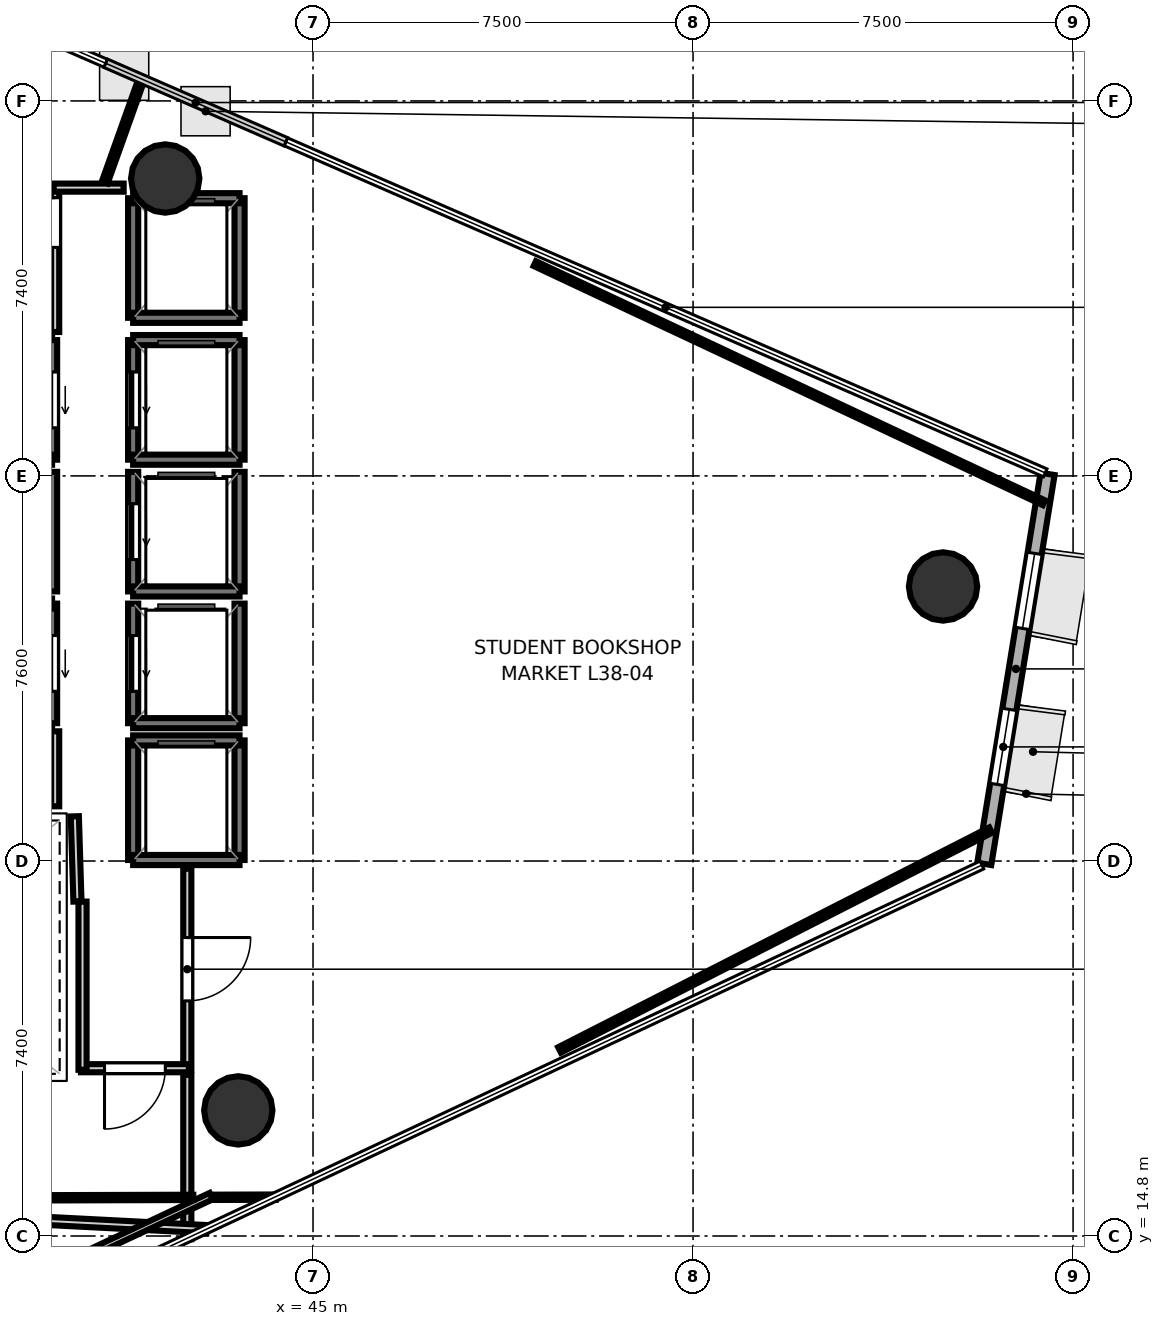
"""IFC4 building model, lengths in metres.
Left out: names, types, materials, properties, quantities, classifications, styles, units other than length and angle.
Written with IfcOpenShell. Run it as: python <this file> out.ifc"""

import sys

from ifc_helpers import new_model, si_unit, direction, frame, frame_2d, origin, origin_2d, place, context, subcontext, project, spatial, rectangle, hollow_circle, extrude, element, fill, save


model = new_model("IFC4")
c1 = context("Model", 3, precision=1e-05, world=origin(), true_north=direction((0.0, 1.0)))
c2 = subcontext(c1, "Body", "Model", "MODEL_VIEW")
j1 = project(units=[si_unit("LENGTHUNIT", "METRE"), si_unit("PLANEANGLEUNIT", "RADIAN")], contexts=[c1])
p1 = place(None, origin())
s1 = spatial("IfcSite", under=j1, at=p1, CompositionType="ELEMENT")
p2 = place(p1, origin())
s2 = spatial("IfcBuilding", under=s1, at=p2, CompositionType="ELEMENT")
p3 = place(p2, frame((0.0, 0.0, 151.3)))
s3 = spatial("IfcBuildingStorey", under=s2, at=p3, CompositionType="ELEMENT", Elevation=151.3)
for number, where, z_axis, x_axis in (
    (1, (57.434, 27.618, 0.0), (0.0, 0.0, 1.0), (1.0, 0.0, 0.0)),
    (2, (42.083, 35.669, 0.0), (0.0, 0.0, 1.0), (1.0, 0.0, 0.0)),
    (3, (43.525, 17.279, 0.0), (0.0, 0.0, 1.0), (1.0, 0.0, 0.0)),
):
    element("IfcColumn", number, at=place(p3, frame(where, z_axis=z_axis, x_axis=x_axis)), inside=s3, PredefinedType="COLUMN", context=c2, shape_type="SweptSolid", body=[
        extrude(hollow_circle(Radius=0.675, WallThickness=0.032, at=origin_2d()), origin(), (0.0, 0.0, 1.0), 3.7),
    ])
p4 = place(p3, frame((58.247, 22.143, 0.0), z_axis=(0.0, 0.0, 1.0), x_axis=(0.160295411126, 0.987069086322, 0.0)))
e4 = element("IfcWall", 4, at=p4, inside=s3, PredefinedType="SOLIDWALL", context=c2, shape_type="SweptSolid", body=[
    extrude(rectangle(XDim=7.798, YDim=0.28, at=frame_2d((3.899, 0.0))), origin(), (0.0, 0.0, 1.0), 3.52),
])
p5 = place(p4, frame((1.589, 0.0, 0.85)))
e5 = element("IfcOpeningElement", 5, at=p5, cuts=e4, PredefinedType="OPENING", context=c2, shape_type="SweptSolid", body=[
    extrude(rectangle(XDim=1.5, YDim=2.1, at=frame_2d((0.75, 1.05))), frame((0.0, 0.15, 0.0), z_axis=(0.0, -1.0, 0.0), x_axis=(1.0, 0.0, 0.0)), (0.0, 0.0, 1.0), 0.3),
])
p6 = place(p4, frame((4.708, 0.0, 0.85)))
e6 = element("IfcOpeningElement", 6, at=p6, cuts=e4, PredefinedType="OPENING", context=c2, shape_type="SweptSolid", body=[
    extrude(rectangle(XDim=1.5, YDim=2.1, at=frame_2d((0.75, 1.05))), frame((0.0, 0.15, 0.0), z_axis=(0.0, -1.0, 0.0), x_axis=(1.0, 0.0, 0.0)), (0.0, 0.0, 1.0), 0.3),
])
p7 = place(p3, frame((39.85, 30.12, 0.0), z_axis=(0.0, 0.0, 1.0), x_axis=(0.0, 1.0, 0.0)))
e7 = element("IfcWall", 7, at=p7, inside=s3, PredefinedType="SOLIDWALL", context=c2, shape_type="SweptSolid", body=[
    extrude(rectangle(XDim=2.36, YDim=0.2, at=frame_2d((1.18, 0.0))), origin(), (0.0, 0.0, 1.0), 3.52),
])
p8 = place(p7, frame((0.63, 0.0, 0.0)))
e8 = element("IfcOpeningElement", 8, at=p8, cuts=e7, PredefinedType="OPENING", context=c2, shape_type="SweptSolid", body=[
    extrude(rectangle(XDim=1.1, YDim=2.15, at=frame_2d((0.55, 1.075))), frame((0.0, 0.11, 0.0), z_axis=(0.0, -1.0, 0.0), x_axis=(1.0, 0.0, 0.0)), (0.0, 0.0, 1.0), 0.22),
])
p9 = place(p3, frame((39.85, 24.92, 0.0), z_axis=(0.0, 0.0, 1.0), x_axis=(0.0, 1.0, 0.0)))
e9 = element("IfcWall", 9, at=p9, inside=s3, PredefinedType="SOLIDWALL", context=c2, shape_type="SweptSolid", body=[
    extrude(rectangle(XDim=2.36, YDim=0.2, at=frame_2d((1.18, 0.0))), origin(), (0.0, 0.0, 1.0), 3.52),
])
p10 = place(p9, frame((0.63, 0.0, 0.0)))
e10 = element("IfcOpeningElement", 10, at=p10, cuts=e9, PredefinedType="OPENING", context=c2, shape_type="SweptSolid", body=[
    extrude(rectangle(XDim=1.1, YDim=2.15, at=frame_2d((0.55, 1.075))), frame((0.0, 0.11, 0.0), z_axis=(0.0, -1.0, 0.0), x_axis=(1.0, 0.0, 0.0)), (0.0, 0.0, 1.0), 0.22),
])
p11 = place(p3, frame((43.55, 30.12, 0.0), z_axis=(0.0, 0.0, 1.0), x_axis=(0.0, 1.0, 0.0)))
e11 = element("IfcWall", 11, at=p11, inside=s3, PredefinedType="SOLIDWALL", context=c2, shape_type="SweptSolid", body=[
    extrude(rectangle(XDim=2.36, YDim=0.2, at=frame_2d((1.18, 0.0))), origin(), (0.0, 0.0, 1.0), 3.52),
])
p12 = place(p3, frame((41.45, 30.12, 0.0), z_axis=(0.0, 0.0, 1.0), x_axis=(0.0, 1.0, 0.0)))
e12 = element("IfcWall", 12, at=p12, inside=s3, PredefinedType="SOLIDWALL", context=c2, shape_type="SweptSolid", body=[
    extrude(rectangle(XDim=2.36, YDim=0.2, at=frame_2d((1.18, 0.0))), origin(), (0.0, 0.0, 1.0), 3.52),
])
p13 = place(p12, frame((0.63, 0.0, 0.0)))
e13 = element("IfcOpeningElement", 13, at=p13, cuts=e12, PredefinedType="OPENING", context=c2, shape_type="SweptSolid", body=[
    extrude(rectangle(XDim=1.1, YDim=2.15, at=frame_2d((0.55, 1.075))), frame((0.0, 0.11, 0.0), z_axis=(0.0, -1.0, 0.0), x_axis=(1.0, 0.0, 0.0)), (0.0, 0.0, 1.0), 0.22),
])
for number, where, z_axis, x_axis in (
    (14, (41.45, 32.48, 0.0), (0.0, 0.0, 1.0), (1.0, 0.0, 0.0)),
    (15, (41.45, 30.12, 0.0), (0.0, 0.0, 1.0), (1.0, 0.0, 0.0)),
):
    element("IfcWall", number, at=place(p3, frame(where, z_axis=z_axis, x_axis=x_axis)), inside=s3, PredefinedType="SOLIDWALL", context=c2, shape_type="SweptSolid", body=[
        extrude(rectangle(XDim=2.1, YDim=0.2, at=frame_2d((1.05, 0.0))), origin(), (0.0, 0.0, 1.0), 3.52),
    ])
p14 = place(p3, frame((43.55, 27.52, 0.0), z_axis=(0.0, 0.0, 1.0), x_axis=(0.0, 1.0, 0.0)))
e16 = element("IfcWall", 16, at=p14, inside=s3, PredefinedType="SOLIDWALL", context=c2, shape_type="SweptSolid", body=[
    extrude(rectangle(XDim=2.36, YDim=0.2, at=frame_2d((1.18, 0.0))), origin(), (0.0, 0.0, 1.0), 3.52),
])
p15 = place(p3, frame((41.45, 27.52, 0.0), z_axis=(0.0, 0.0, 1.0), x_axis=(0.0, 1.0, 0.0)))
e17 = element("IfcWall", 17, at=p15, inside=s3, PredefinedType="SOLIDWALL", context=c2, shape_type="SweptSolid", body=[
    extrude(rectangle(XDim=2.36, YDim=0.2, at=frame_2d((1.18, 0.0))), origin(), (0.0, 0.0, 1.0), 3.52),
])
p16 = place(p15, frame((0.63, 0.0, 0.0)))
e18 = element("IfcOpeningElement", 18, at=p16, cuts=e17, PredefinedType="OPENING", context=c2, shape_type="SweptSolid", body=[
    extrude(rectangle(XDim=1.1, YDim=2.15, at=frame_2d((0.55, 1.075))), frame((0.0, 0.11, 0.0), z_axis=(0.0, -1.0, 0.0), x_axis=(1.0, 0.0, 0.0)), (0.0, 0.0, 1.0), 0.22),
])
p17 = place(p3, frame((41.45, 27.52, 0.0), z_axis=(0.0, 0.0, 1.0), x_axis=(1.0, 0.0, 0.0)))
e19 = element("IfcWall", 19, at=p17, inside=s3, PredefinedType="SOLIDWALL", context=c2, shape_type="SweptSolid", body=[
    extrude(rectangle(XDim=2.1, YDim=0.2, at=frame_2d((1.05, 0.0))), origin(), (0.0, 0.0, 1.0), 3.52),
])
p18 = place(p3, frame((43.55, 24.92, 0.0), z_axis=(0.0, 0.0, 1.0), x_axis=(0.0, 1.0, 0.0)))
e20 = element("IfcWall", 20, at=p18, inside=s3, PredefinedType="SOLIDWALL", context=c2, shape_type="SweptSolid", body=[
    extrude(rectangle(XDim=2.36, YDim=0.2, at=frame_2d((1.18, 0.0))), origin(), (0.0, 0.0, 1.0), 3.52),
])
p19 = place(p3, frame((41.45, 24.92, 0.0), z_axis=(0.0, 0.0, 1.0), x_axis=(0.0, 1.0, 0.0)))
e21 = element("IfcWall", 21, at=p19, inside=s3, PredefinedType="SOLIDWALL", context=c2, shape_type="SweptSolid", body=[
    extrude(rectangle(XDim=2.36, YDim=0.2, at=frame_2d((1.18, 0.0))), origin(), (0.0, 0.0, 1.0), 3.52),
])
p20 = place(p19, frame((0.63, 0.0, 0.0)))
e22 = element("IfcOpeningElement", 22, at=p20, cuts=e21, PredefinedType="OPENING", context=c2, shape_type="SweptSolid", body=[
    extrude(rectangle(XDim=1.1, YDim=2.15, at=frame_2d((0.55, 1.075))), frame((0.0, 0.11, 0.0), z_axis=(0.0, -1.0, 0.0), x_axis=(1.0, 0.0, 0.0)), (0.0, 0.0, 1.0), 0.22),
])
p21 = place(p3, frame((41.45, 24.92, 0.0), z_axis=(0.0, 0.0, 1.0), x_axis=(1.0, 0.0, 0.0)))
e23 = element("IfcWall", 23, at=p21, inside=s3, PredefinedType="SOLIDWALL", context=c2, shape_type="SweptSolid", body=[
    extrude(rectangle(XDim=2.1, YDim=0.2, at=frame_2d((1.05, 0.0))), origin(), (0.0, 0.0, 1.0), 3.52),
])
p22 = place(p3, frame((39.85, 27.52, 0.0), z_axis=(0.0, 0.0, 1.0), x_axis=(0.0, 1.0, 0.0)))
e24 = element("IfcWall", 24, at=p22, inside=s3, PredefinedType="SOLIDWALL", context=c2, shape_type="SweptSolid", body=[
    extrude(rectangle(XDim=2.36, YDim=0.2, at=frame_2d((1.18, 0.0))), origin(), (0.0, 0.0, 1.0), 3.52),
])
for number, where, z_axis, x_axis in (
    (25, (43.55, 22.22, 0.0), (0.0, 0.0, 1.0), (0.0, 1.0, 0.0)),
    (26, (41.45, 22.22, 0.0), (0.0, 0.0, 1.0), (0.0, 1.0, 0.0)),
):
    element("IfcWall", number, at=place(p3, frame(where, z_axis=z_axis, x_axis=x_axis)), inside=s3, PredefinedType="SOLIDWALL", context=c2, shape_type="SweptSolid", body=[
        extrude(rectangle(XDim=2.36, YDim=0.2, at=frame_2d((1.18, 0.0))), origin(), (0.0, 0.0, 1.0), 3.52),
    ])
for number, where, z_axis, x_axis in (
    (27, (41.45, 24.58, 0.0), (0.0, 0.0, 1.0), (1.0, 0.0, 0.0)),
    (28, (41.45, 22.22, 0.0), (0.0, 0.0, 1.0), (1.0, 0.0, 0.0)),
):
    element("IfcWall", number, at=place(p3, frame(where, z_axis=z_axis, x_axis=x_axis)), inside=s3, PredefinedType="SOLIDWALL", context=c2, shape_type="SweptSolid", body=[
        extrude(rectangle(XDim=2.1, YDim=0.2, at=frame_2d((1.05, 0.0))), origin(), (0.0, 0.0, 1.0), 3.52),
    ])
for number, where, z_axis, x_axis in (
    (29, (43.55, 32.92, 0.0), (0.0, 0.0, 1.0), (0.0, 1.0, 0.0)),
    (30, (41.45, 32.92, 0.0), (0.0, 0.0, 1.0), (0.0, 1.0, 0.0)),
):
    element("IfcWall", number, at=place(p3, frame(where, z_axis=z_axis, x_axis=x_axis)), inside=s3, PredefinedType="SOLIDWALL", context=c2, shape_type="SweptSolid", body=[
        extrude(rectangle(XDim=2.36, YDim=0.2, at=frame_2d((1.18, 0.0))), origin(), (0.0, 0.0, 1.0), 3.52),
    ])
for number, where, z_axis, x_axis in (
    (31, (41.45, 35.28, 0.0), (0.0, 0.0, 1.0), (1.0, 0.0, 0.0)),
    (32, (41.45, 32.92, 0.0), (0.0, 0.0, 1.0), (1.0, 0.0, 0.0)),
):
    element("IfcWall", number, at=place(p3, frame(where, z_axis=z_axis, x_axis=x_axis)), inside=s3, PredefinedType="SOLIDWALL", context=c2, shape_type="SweptSolid", body=[
        extrude(rectangle(XDim=2.1, YDim=0.2, at=frame_2d((1.05, 0.0))), origin(), (0.0, 0.0, 1.0), 3.52),
    ])
p23 = place(p3, frame((40.351, 21.401, 0.0), z_axis=(0.0, 0.0, 1.0), x_axis=(-0.031058045979, 0.999517582527, 0.0)))
e33 = element("IfcWall", 33, at=p23, inside=s3, PredefinedType="PARTITIONING", context=c2, shape_type="SweptSolid", body=[
    extrude(rectangle(XDim=1.682, YDim=0.16, at=frame_2d((0.841, 0.0))), origin(), (0.0, 0.0, 1.0), 2.84),
])
p24 = place(p3, frame((39.911, 23.28, 0.0), z_axis=(0.0, 0.0, 1.0), x_axis=(0.0, 1.0, 0.0)))
e34 = element("IfcWall", 34, at=p24, inside=s3, PredefinedType="PARTITIONING", context=c2, shape_type="SweptSolid", body=[
    extrude(rectangle(XDim=1.48, YDim=0.16, at=frame_2d((0.74, 0.0))), origin(), (0.0, 0.0, 1.0), 2.84),
])
p25 = place(p3, frame((39.911, 32.64, 0.0), z_axis=(0.0, 0.0, 1.0), x_axis=(0.0, 1.0, 0.0)))
e35 = element("IfcWall", 35, at=p25, inside=s3, PredefinedType="PARTITIONING", context=c2, shape_type="SweptSolid", body=[
    extrude(rectangle(XDim=2.88, YDim=0.16, at=frame_2d((1.44, 0.0))), origin(), (0.0, 0.0, 1.0), 2.84),
])
p26 = place(p25, frame((1.67, 0.0, 0.0)))
e36 = element("IfcOpeningElement", 36, at=p26, cuts=e35, PredefinedType="OPENING", context=c2, shape_type="SweptSolid", body=[
    extrude(rectangle(XDim=0.98, YDim=2.1, at=frame_2d((0.49, 1.05))), frame((0.0, 0.09, 0.0), z_axis=(0.0, -1.0, 0.0), x_axis=(1.0, 0.0, 0.0)), (0.0, 0.0, 1.0), 0.18),
])
p27 = place(p3, frame((39.88, 35.489, 0.0), z_axis=(0.0, 0.0, 1.0), x_axis=(1.0, 0.0, 0.0)))
e37 = element("IfcWall", 37, at=p27, inside=s3, PredefinedType="PARTITIONING", context=c2, shape_type="SweptSolid", body=[
    extrude(rectangle(XDim=1.383, YDim=0.16, at=frame_2d((0.691, 0.0))), origin(), (0.0, 0.0, 1.0), 2.84),
])
p28 = place(p3, frame((42.519, 22.05, 0.0), z_axis=(0.0, 0.0, 1.0), x_axis=(0.0, -1.0, 0.0)))
e38 = element("IfcWall", 38, at=p28, inside=s3, PredefinedType="PARTITIONING", context=c2, shape_type="SweptSolid", body=[
    extrude(rectangle(XDim=3.97, YDim=0.16, at=frame_2d((1.985, 0.0))), origin(), (0.0, 0.0, 1.0), 2.84),
])
p29 = place(p28, frame((1.36, 0.0, 0.0)))
e39 = element("IfcOpeningElement", 39, at=p29, cuts=e38, PredefinedType="OPENING", context=c2, shape_type="SweptSolid", body=[
    extrude(rectangle(XDim=1.25, YDim=2.2, at=frame_2d((0.625, 1.1))), frame((0.0, 0.09, 0.0), z_axis=(0.0, -1.0, 0.0), x_axis=(1.0, 0.0, 0.0)), (0.0, 0.0, 1.0), 0.18),
])
p30 = place(p3, frame((42.55, 18.111, 0.0), z_axis=(0.0, 0.0, 1.0), x_axis=(-1.0, 0.0, 0.0)))
e40 = element("IfcWall", 40, at=p30, inside=s3, PredefinedType="PARTITIONING", context=c2, shape_type="SweptSolid", body=[
    extrude(rectangle(XDim=2.13, YDim=0.16, at=frame_2d((1.065, 0.0))), origin(), (0.0, 0.0, 1.0), 2.84),
])
p31 = place(p30, frame((0.465, 0.0, 0.0)))
e41 = element("IfcOpeningElement", 41, at=p31, cuts=e40, PredefinedType="OPENING", context=c2, shape_type="SweptSolid", body=[
    extrude(rectangle(XDim=1.2, YDim=2.15, at=frame_2d((0.6, 1.075))), frame((0.0, 0.09, 0.0), z_axis=(0.0, -1.0, 0.0), x_axis=(1.0, 0.0, 0.0)), (0.0, 0.0, 1.0), 0.18),
])
p32 = place(p3, frame((40.451, 18.08, 0.0), z_axis=(0.0, 0.0, 1.0), x_axis=(0.0, 1.0, 0.0)))
e42 = element("IfcWall", 42, at=p32, inside=s3, PredefinedType="PARTITIONING", context=c2, shape_type="SweptSolid", body=[
    extrude(rectangle(XDim=3.32, YDim=0.16, at=frame_2d((1.66, 0.0))), origin(), (0.0, 0.0, 1.0), 2.84),
])
p33 = place(p3, frame((42.519, 17.98, 0.0), z_axis=(0.0, 0.0, 1.0), x_axis=(0.0, -1.0, 0.0)))
e43 = element("IfcWall", 43, at=p33, inside=s3, PredefinedType="PARTITIONING", context=c2, shape_type="SweptSolid", body=[
    extrude(rectangle(XDim=3.243, YDim=0.16, at=frame_2d((1.621, 0.0))), origin(), (0.0, 0.0, 1.0), 2.84),
])
p34 = place(p3, frame((42.9, 14.936, 0.0), z_axis=(0.0, 0.0, 1.0), x_axis=(-0.998683138802, 0.051302907066, 0.0)))
e44 = element("IfcWall", 44, at=p34, inside=s3, PredefinedType="PARTITIONING", context=c2, shape_type="SweptSolid", body=[
    extrude(rectangle(XDim=14.519, YDim=0.16, at=frame_2d((7.26, 0.0))), origin(), (0.0, 0.0, 1.0), 2.84),
])
p35 = place(p34, frame((10.501, 0.0, 0.0)))
e45 = element("IfcOpeningElement", 45, at=p35, cuts=e44, PredefinedType="OPENING", context=c2, shape_type="SweptSolid", body=[
    extrude(rectangle(XDim=1.25, YDim=2.2, at=frame_2d((0.625, 1.1))), frame((0.0, 0.09, 0.0), z_axis=(0.0, -1.0, 0.0), x_axis=(1.0, 0.0, 0.0)), (0.0, 0.0, 1.0), 0.18),
])
p36 = place(p34, frame((7.184, 0.0, 0.0)))
e46 = element("IfcOpeningElement", 46, at=p36, cuts=e44, PredefinedType="OPENING", context=c2, shape_type="SweptSolid", body=[
    extrude(rectangle(XDim=1.05, YDim=2.15, at=frame_2d((0.525, 1.075))), frame((0.0, 0.09, 0.0), z_axis=(0.0, -1.0, 0.0), x_axis=(1.0, 0.0, 0.0)), (0.0, 0.0, 1.0), 0.18),
])
p37 = place(p3, frame((42.99, 15.587, 0.0), z_axis=(0.0, 0.0, 1.0), x_axis=(-0.905178107645, -0.42503246163, 0.0)))
e47 = element("IfcWall", 47, at=p37, inside=s3, PredefinedType="PARTITIONING", context=c2, shape_type="SweptSolid", body=[
    extrude(rectangle(XDim=9.382, YDim=0.14, at=frame_2d((4.691, 0.0))), origin(), (0.0, 0.0, 1.0), 2.84),
])
p38 = place(p3, frame((35.768, 15.543, 0.0), z_axis=(0.0, 0.0, 1.0), x_axis=(0.999995856362, 0.002878759795, 0.0)))
e48 = element("IfcWall", 48, at=p38, inside=s3, PredefinedType="PARTITIONING", context=c2, shape_type="SweptSolid", body=[
    extrude(rectangle(XDim=6.869, YDim=0.105, at=frame_2d((3.435, 0.0))), origin(), (0.0, 0.0, 1.0), 2.84),
])
p39 = place(p3, frame((40.888, 35.59, 0.0), z_axis=(0.0, 0.0, 1.0), x_axis=(0.336053947572, 0.941842738636, 0.0)))
e49 = element("IfcWall", 49, at=p39, inside=s3, PredefinedType="PARTITIONING", context=c2, shape_type="SweptSolid", body=[
    extrude(rectangle(XDim=2.19, YDim=0.12, at=frame_2d((1.095, 0.0))), origin(), (0.0, 0.0, 1.0), 2.84),
])
p40 = place(p3, frame((49.377, 33.99, 0.0), z_axis=(0.0, 0.0, 1.0), x_axis=(0.905132467521, -0.42512964639, 0.0)))
e50 = element("IfcWall", 50, at=p40, inside=s3, PredefinedType="PARTITIONING", context=c2, shape_type="SweptSolid", body=[
    extrude(rectangle(XDim=11.101, YDim=0.105, at=frame_2d((5.55, 0.0))), origin(), (0.0, 0.0, 1.0), 2.84),
])
p41 = place(p3, frame((58.373, 22.81, 0.0), z_axis=(0.0, 0.0, 1.0), x_axis=(-0.890845286188, -0.45430680831, 0.0)))
e51 = element("IfcWall", 51, at=p41, inside=s3, PredefinedType="PARTITIONING", context=c2, shape_type="SweptSolid", body=[
    extrude(rectangle(XDim=9.55, YDim=0.12, at=frame_2d((4.775, 0.0))), origin(), (0.0, 0.0, 1.0), 2.84),
])
p42 = place(p3, frame((43.002, 15.563, 0.0), z_axis=(0.0, 0.0, 1.0), x_axis=(0.99999578947, 0.002901903045, 0.0)))
e52 = element("IfcWall", 52, at=p42, inside=s3, PredefinedType="PARTITIONING", context=c2, shape_type="SweptSolid", body=[
    extrude(rectangle(XDim=1.262, YDim=0.105, at=frame_2d((0.631, 0.0))), origin(), (0.0, 0.0, 1.0), 2.84),
])
p43 = place(p8, origin())
e53 = element("IfcDoor", 53, at=p43, inside=s3, OperationType="SLIDING_TO_LEFT", PredefinedType="DOOR", context=c2, shape_type="SweptSolid", body=[
    extrude(rectangle(XDim=1.1, YDim=2.15, at=frame_2d((0.55, 1.075))), frame((0.0, 0.025, 0.0), z_axis=(0.0, -1.0, 0.0), x_axis=(1.0, 0.0, 0.0)), (0.0, 0.0, 1.0), 0.05),
])
fill(e8, e53)
p44 = place(p10, origin())
e54 = element("IfcDoor", 54, at=p44, inside=s3, OperationType="SLIDING_TO_LEFT", PredefinedType="DOOR", context=c2, shape_type="SweptSolid", body=[
    extrude(rectangle(XDim=1.1, YDim=2.15, at=frame_2d((0.55, 1.075))), frame((0.0, 0.025, 0.0), z_axis=(0.0, -1.0, 0.0), x_axis=(1.0, 0.0, 0.0)), (0.0, 0.0, 1.0), 0.05),
])
fill(e10, e54)
p45 = place(p13, origin())
e55 = element("IfcDoor", 55, at=p45, inside=s3, OperationType="SLIDING_TO_LEFT", PredefinedType="DOOR", context=c2, shape_type="SweptSolid", body=[
    extrude(rectangle(XDim=1.1, YDim=2.15, at=frame_2d((0.55, 1.075))), frame((0.0, 0.025, 0.0), z_axis=(0.0, -1.0, 0.0), x_axis=(1.0, 0.0, 0.0)), (0.0, 0.0, 1.0), 0.05),
])
fill(e13, e55)
p46 = place(p16, origin())
e56 = element("IfcDoor", 56, at=p46, inside=s3, OperationType="SLIDING_TO_LEFT", PredefinedType="DOOR", context=c2, shape_type="SweptSolid", body=[
    extrude(rectangle(XDim=1.1, YDim=2.15, at=frame_2d((0.55, 1.075))), frame((0.0, 0.025, 0.0), z_axis=(0.0, -1.0, 0.0), x_axis=(1.0, 0.0, 0.0)), (0.0, 0.0, 1.0), 0.05),
])
fill(e18, e56)
p47 = place(p20, origin())
e57 = element("IfcDoor", 57, at=p47, inside=s3, OperationType="SLIDING_TO_LEFT", PredefinedType="DOOR", context=c2, shape_type="SweptSolid", body=[
    extrude(rectangle(XDim=1.1, YDim=2.15, at=frame_2d((0.55, 1.075))), frame((0.0, 0.025, 0.0), z_axis=(0.0, -1.0, 0.0), x_axis=(1.0, 0.0, 0.0)), (0.0, 0.0, 1.0), 0.05),
])
fill(e22, e57)
p48 = place(p31, origin())
e58 = element("IfcDoor", 58, at=p48, inside=s3, OperationType="SINGLE_SWING_RIGHT", PredefinedType="DOOR", context=c2, shape_type="SweptSolid", body=[
    extrude(rectangle(XDim=1.2, YDim=2.15, at=frame_2d((0.6, 1.075))), frame((0.0, 0.025, 0.0), z_axis=(0.0, -1.0, 0.0), x_axis=(1.0, 0.0, 0.0)), (0.0, 0.0, 1.0), 0.05),
])
fill(e41, e58)
p49 = place(p29, origin())
e59 = element("IfcDoor", 59, at=p49, inside=s3, OperationType="SINGLE_SWING_LEFT", PredefinedType="DOOR", context=c2, shape_type="SweptSolid", body=[
    extrude(rectangle(XDim=1.25, YDim=2.2, at=frame_2d((0.625, 1.1))), frame((0.0, 0.025, 0.0), z_axis=(0.0, -1.0, 0.0), x_axis=(1.0, 0.0, 0.0)), (0.0, 0.0, 1.0), 0.05),
])
fill(e39, e59)
p50 = place(p26, origin())
e60 = element("IfcDoor", 60, at=p50, inside=s3, OperationType="SINGLE_SWING_RIGHT", PredefinedType="DOOR", context=c2, shape_type="SweptSolid", body=[
    extrude(rectangle(XDim=0.98, YDim=2.1, at=frame_2d((0.49, 1.05))), frame((0.0, 0.025, 0.0), z_axis=(0.0, -1.0, 0.0), x_axis=(1.0, 0.0, 0.0)), (0.0, 0.0, 1.0), 0.05),
])
fill(e36, e60)
p51 = place(p5, origin())
e61 = element("IfcWindow", 61, at=p51, inside=s3, PartitioningType="SINGLE_PANEL", PredefinedType="WINDOW", context=c2, shape_type="SweptSolid", body=[
    extrude(rectangle(XDim=1.5, YDim=2.1, at=frame_2d((0.75, 1.05))), frame((0.0, 0.03, 0.0), z_axis=(0.0, -1.0, 0.0), x_axis=(1.0, 0.0, 0.0)), (0.0, 0.0, 1.0), 0.06),
])
fill(e5, e61)
p52 = place(p6, origin())
e62 = element("IfcWindow", 62, at=p52, inside=s3, PartitioningType="SINGLE_PANEL", PredefinedType="WINDOW", context=c2, shape_type="SweptSolid", body=[
    extrude(rectangle(XDim=1.5, YDim=2.1, at=frame_2d((0.75, 1.05))), frame((0.0, 0.03, 0.0), z_axis=(0.0, -1.0, 0.0), x_axis=(1.0, 0.0, 0.0)), (0.0, 0.0, 1.0), 0.06),
])
fill(e6, e62)
save(model, sys.argv[1])
